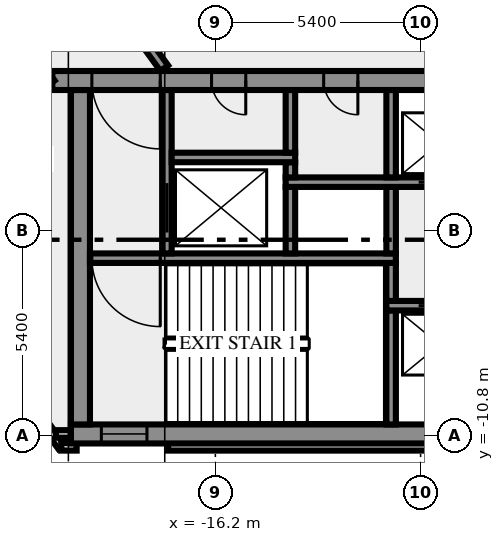
"""IFC4 building model, lengths in metres.
Left out: names, types, materials, properties, quantities, classifications, styles, units other than length and angle.
Written with IfcOpenShell. Run it as: python <this file> out.ifc"""

import sys

from ifc_helpers import new_model, si_unit, direction, frame, frame_2d, origin, place, context, subcontext, project, spatial, rectangle, extrude, element, fill, save


model = new_model("IFC4")
c1 = context("Model", 3, precision=1e-05, world=origin(), true_north=direction((0.0, 1.0)))
c2 = subcontext(c1, "Body", "Model", "MODEL_VIEW")
j1 = project(units=[si_unit("LENGTHUNIT", "METRE"), si_unit("PLANEANGLEUNIT", "RADIAN")], contexts=[c1])
p1 = place(None, origin())
s1 = spatial("IfcSite", under=j1, at=p1, CompositionType="ELEMENT")
p2 = place(p1, origin())
s2 = spatial("IfcBuilding", under=s1, at=p2, CompositionType="ELEMENT")
p3 = place(p2, frame((0.0, 0.0, 63.0)))
s3 = spatial("IfcBuildingStorey", under=s2, at=p3, CompositionType="ELEMENT", Elevation=63.0)
p4 = place(p3, frame((-21.833, -8.909, 0.0), z_axis=(0.0, 0.0, 1.0), x_axis=(0.587766567315, -0.809030569476, 0.0)))
e1 = element("IfcWall", 1, at=p4, inside=s3, PredefinedType="SOLIDWALL", context=c2, shape_type="SweptSolid", body=[
    extrude(rectangle(XDim=2.688, YDim=0.2, at=frame_2d((1.344, 0.0))), origin(), (0.0, 0.0, 1.0), 3.65),
])
p5 = place(p3, frame((-20.256, -11.088, 0.0), z_axis=(0.0, 0.0, 1.0), x_axis=(1.0, 0.0, 0.0)))
e2 = element("IfcWall", 2, at=p5, inside=s3, PredefinedType="SOLIDWALL", context=c2, shape_type="SweptSolid", body=[
    extrude(rectangle(XDim=0.406, YDim=0.2, at=frame_2d((0.203, 0.0))), origin(), (0.0, 0.0, 1.0), 3.65),
])
p6 = place(p3, frame((-17.444, -11.088, 0.0), z_axis=(0.0, 0.0, 1.0), x_axis=(1.0, 0.0, 0.0)))
e3 = element("IfcWall", 3, at=p6, inside=s3, PredefinedType="SOLIDWALL", context=c2, shape_type="SweptSolid", body=[
    extrude(rectangle(XDim=34.888, YDim=0.2, at=frame_2d((17.444, 0.0))), origin(), (0.0, 0.0, 1.0), 3.65),
])
p7 = place(p3, frame((-19.98, -10.75, 0.0), z_axis=(0.0, 0.0, 1.0), x_axis=(-1.0, 0.0, 0.0)))
e4 = element("IfcWall", 4, at=p7, inside=s3, PredefinedType="SOLIDWALL", context=c2, shape_type="SweptSolid", body=[
    extrude(rectangle(XDim=0.417, YDim=0.2, at=frame_2d((0.208, 0.0))), origin(), (0.0, 0.0, 1.0), 3.65),
])
p8 = place(p3, frame((-20.0, -10.75, 0.0), z_axis=(0.0, 0.0, 1.0), x_axis=(1.0, 0.0, 0.0)))
e5 = element("IfcWall", 5, at=p8, inside=s3, PredefinedType="SHEAR", context=c2, shape_type="SweptSolid", body=[
    extrude(rectangle(XDim=40.0, YDim=0.5, at=frame_2d((20.0, 0.0))), origin(), (0.0, 0.0, 1.0), 3.65),
])
p9 = place(p8, frame((0.8, 0.0, 1.0)))
e6 = element("IfcOpeningElement", 6, at=p9, cuts=e5, PredefinedType="OPENING", context=c2, shape_type="SweptSolid", body=[
    extrude(rectangle(XDim=1.2, YDim=1.2, at=frame_2d((0.6, 0.6))), frame((0.0, 0.26, 0.0), z_axis=(0.0, -1.0, 0.0), x_axis=(1.0, 0.0, 0.0)), (0.0, 0.0, 1.0), 0.52),
])
p10 = place(p8, frame((38.0, 0.0, 1.0)))
e7 = element("IfcOpeningElement", 7, at=p10, cuts=e5, PredefinedType="OPENING", context=c2, shape_type="SweptSolid", body=[
    extrude(rectangle(XDim=1.2, YDim=1.2, at=frame_2d((0.6, 0.6))), frame((0.0, 0.26, 0.0), z_axis=(0.0, -1.0, 0.0), x_axis=(1.0, 0.0, 0.0)), (0.0, 0.0, 1.0), 0.52),
])
p11 = place(p3, frame((-19.75, -10.5, 0.0), z_axis=(0.0, 0.0, 1.0), x_axis=(0.0, 1.0, 0.0)))
e8 = element("IfcWall", 8, at=p11, inside=s3, PredefinedType="SHEAR", context=c2, shape_type="SweptSolid", body=[
    extrude(rectangle(XDim=8.8, YDim=0.5, at=frame_2d((4.4, 0.0))), origin(), (0.0, 0.0, 1.0), 3.65),
])
p12 = place(p3, frame((-11.575, -10.5, 0.0), z_axis=(0.0, 0.0, 1.0), x_axis=(0.0, 1.0, 0.0)))
e9 = element("IfcWall", 9, at=p12, inside=s3, PredefinedType="SHEAR", context=c2, shape_type="SweptSolid", body=[
    extrude(rectangle(XDim=3.0, YDim=0.25, at=frame_2d((1.5, 0.0))), origin(), (0.0, 0.0, 1.0), 3.65),
])
p13 = place(p3, frame((11.7, -7.375, 0.0), z_axis=(0.0, 0.0, 1.0), x_axis=(-1.0, 0.0, 0.0)))
e10 = element("IfcWall", 10, at=p13, inside=s3, PredefinedType="SHEAR", context=c2, shape_type="SweptSolid", body=[
    extrude(rectangle(XDim=23.4, YDim=0.25, at=frame_2d((11.7, 0.0))), origin(), (0.0, 0.0, 1.0), 3.65),
])
p14 = place(p13, frame((21.45, 0.0, 0.0)))
e11 = element("IfcOpeningElement", 11, at=p14, cuts=e10, PredefinedType="OPENING", context=c2, shape_type="SweptSolid", body=[
    extrude(rectangle(XDim=1.1, YDim=2.1, at=frame_2d((0.55, 1.05))), frame((0.0, 0.135, 0.0), z_axis=(0.0, -1.0, 0.0), x_axis=(1.0, 0.0, 0.0)), (0.0, 0.0, 1.0), 0.27),
])
p15 = place(p13, frame((18.95, 0.0, 0.0)))
e12 = element("IfcOpeningElement", 12, at=p15, cuts=e10, PredefinedType="OPENING", context=c2, shape_type="SweptSolid", body=[
    extrude(rectangle(XDim=1.1, YDim=2.1, at=frame_2d((0.55, 1.05))), frame((0.0, 0.135, 0.0), z_axis=(0.0, -1.0, 0.0), x_axis=(1.0, 0.0, 0.0)), (0.0, 0.0, 1.0), 0.27),
])
p16 = place(p13, frame((16.45, 0.0, 0.0)))
e13 = element("IfcOpeningElement", 13, at=p16, cuts=e10, PredefinedType="OPENING", context=c2, shape_type="SweptSolid", body=[
    extrude(rectangle(XDim=1.1, YDim=2.1, at=frame_2d((0.55, 1.05))), frame((0.0, 0.135, 0.0), z_axis=(0.0, -1.0, 0.0), x_axis=(1.0, 0.0, 0.0)), (0.0, 0.0, 1.0), 0.27),
])
p17 = place(p13, frame((14.5, 0.0, 0.0)))
e14 = element("IfcOpeningElement", 14, at=p17, cuts=e10, PredefinedType="OPENING", context=c2, shape_type="SweptSolid", body=[
    extrude(rectangle(XDim=0.9, YDim=2.1, at=frame_2d((0.45, 1.05))), frame((0.0, 0.135, 0.0), z_axis=(0.0, -1.0, 0.0), x_axis=(1.0, 0.0, 0.0)), (0.0, 0.0, 1.0), 0.27),
])
p18 = place(p13, frame((12.95, 0.0, 0.0)))
e15 = element("IfcOpeningElement", 15, at=p18, cuts=e10, PredefinedType="OPENING", context=c2, shape_type="SweptSolid", body=[
    extrude(rectangle(XDim=0.9, YDim=2.1, at=frame_2d((0.45, 1.05))), frame((0.0, 0.135, 0.0), z_axis=(0.0, -1.0, 0.0), x_axis=(1.0, 0.0, 0.0)), (0.0, 0.0, 1.0), 0.27),
])
p19 = place(p13, frame((11.475, 0.0, 0.0)))
e16 = element("IfcOpeningElement", 16, at=p19, cuts=e10, PredefinedType="OPENING", context=c2, shape_type="SweptSolid", body=[
    extrude(rectangle(XDim=0.9, YDim=2.1, at=frame_2d((0.45, 1.05))), frame((0.0, 0.135, 0.0), z_axis=(0.0, -1.0, 0.0), x_axis=(1.0, 0.0, 0.0)), (0.0, 0.0, 1.0), 0.27),
])
p20 = place(p13, frame((10.45, 0.0, 0.0)))
e17 = element("IfcOpeningElement", 17, at=p20, cuts=e10, PredefinedType="OPENING", context=c2, shape_type="SweptSolid", body=[
    extrude(rectangle(XDim=0.5, YDim=2.1, at=frame_2d((0.25, 1.05))), frame((0.0, 0.135, 0.0), z_axis=(0.0, -1.0, 0.0), x_axis=(1.0, 0.0, 0.0)), (0.0, 0.0, 1.0), 0.27),
])
p21 = place(p3, frame((-11.575, -7.25, 0.0), z_axis=(0.0, 0.0, 1.0), x_axis=(0.0, 1.0, 0.0)))
e18 = element("IfcWall", 18, at=p21, inside=s3, PredefinedType="SHEAR", context=c2, shape_type="SweptSolid", body=[
    extrude(rectangle(XDim=1.0, YDim=0.25, at=frame_2d((0.5, 0.0))), origin(), (0.0, 0.0, 1.0), 3.65),
])
p22 = place(p3, frame((-11.45, -6.125, 0.0), z_axis=(0.0, 0.0, 1.0), x_axis=(-1.0, 0.0, 0.0)))
e19 = element("IfcWall", 19, at=p22, inside=s3, PredefinedType="SHEAR", context=c2, shape_type="SweptSolid", body=[
    extrude(rectangle(XDim=8.05, YDim=0.25, at=frame_2d((4.025, 0.0))), origin(), (0.0, 0.0, 1.0), 3.65),
])
p23 = place(p22, frame((6.2, 0.0, 0.0)))
e20 = element("IfcOpeningElement", 20, at=p23, cuts=e19, PredefinedType="OPENING", context=c2, shape_type="SweptSolid", body=[
    extrude(rectangle(XDim=1.8, YDim=2.1, at=frame_2d((0.9, 1.05))), frame((0.0, 0.135, 0.0), z_axis=(0.0, -1.0, 0.0), x_axis=(1.0, 0.0, 0.0)), (0.0, 0.0, 1.0), 0.27),
])
p24 = place(p3, frame((-17.475, -6.0, 0.0), z_axis=(0.0, 0.0, 1.0), x_axis=(0.0, 1.0, 0.0)))
e21 = element("IfcWall", 21, at=p24, inside=s3, PredefinedType="SHEAR", context=c2, shape_type="SweptSolid", body=[
    extrude(rectangle(XDim=4.3, YDim=0.25, at=frame_2d((2.15, 0.0))), origin(), (0.0, 0.0, 1.0), 3.65),
])
p25 = place(p24, frame((0.55, 0.0, 0.0)))
e22 = element("IfcOpeningElement", 22, at=p25, cuts=e21, PredefinedType="OPENING", context=c2, shape_type="SweptSolid", body=[
    extrude(rectangle(XDim=1.3, YDim=2.1, at=frame_2d((0.65, 1.05))), frame((0.0, 0.135, 0.0), z_axis=(0.0, -1.0, 0.0), x_axis=(1.0, 0.0, 0.0)), (0.0, 0.0, 1.0), 0.27),
])
for number, where, z_axis, x_axis in (
    (23, (-14.225, -6.0, 0.0), (0.0, 0.0, 1.0), (0.0, 1.0, 0.0)),
    (24, (-11.575, -6.0, 0.0), (0.0, 0.0, 1.0), (0.0, 1.0, 0.0)),
):
    element("IfcWall", number, at=place(p3, frame(where, z_axis=z_axis, x_axis=x_axis)), inside=s3, PredefinedType="SHEAR", context=c2, shape_type="SweptSolid", body=[
        extrude(rectangle(XDim=1.75, YDim=0.25, at=frame_2d((0.875, 0.0))), origin(), (0.0, 0.0, 1.0), 3.65),
    ])
p26 = place(p3, frame((-14.35, -4.125, 0.0), z_axis=(0.0, 0.0, 1.0), x_axis=(1.0, 0.0, 0.0)))
e25 = element("IfcWall", 25, at=p26, inside=s3, PredefinedType="SHEAR", context=c2, shape_type="SweptSolid", body=[
    extrude(rectangle(XDim=12.7, YDim=0.25, at=frame_2d((6.35, 0.0))), origin(), (0.0, 0.0, 1.0), 3.65),
])
p27 = place(p26, frame((3.5, 0.0, 0.0)))
e26 = element("IfcOpeningElement", 26, at=p27, cuts=e25, PredefinedType="OPENING", context=c2, shape_type="SweptSolid", body=[
    extrude(rectangle(XDim=1.1, YDim=2.1, at=frame_2d((0.55, 1.05))), frame((0.0, 0.135, 0.0), z_axis=(0.0, -1.0, 0.0), x_axis=(1.0, 0.0, 0.0)), (0.0, 0.0, 1.0), 0.27),
])
p28 = place(p26, frame((6.0, 0.0, 0.0)))
e27 = element("IfcOpeningElement", 27, at=p28, cuts=e25, PredefinedType="OPENING", context=c2, shape_type="SweptSolid", body=[
    extrude(rectangle(XDim=1.1, YDim=2.1, at=frame_2d((0.55, 1.05))), frame((0.0, 0.135, 0.0), z_axis=(0.0, -1.0, 0.0), x_axis=(1.0, 0.0, 0.0)), (0.0, 0.0, 1.0), 0.27),
])
p29 = place(p26, frame((8.5, 0.0, 0.0)))
e28 = element("IfcOpeningElement", 28, at=p29, cuts=e25, PredefinedType="OPENING", context=c2, shape_type="SweptSolid", body=[
    extrude(rectangle(XDim=1.1, YDim=2.1, at=frame_2d((0.55, 1.05))), frame((0.0, 0.135, 0.0), z_axis=(0.0, -1.0, 0.0), x_axis=(1.0, 0.0, 0.0)), (0.0, 0.0, 1.0), 0.27),
])
p30 = place(p3, frame((-14.225, -4.0, 0.0), z_axis=(0.0, 0.0, 1.0), x_axis=(0.0, 1.0, 0.0)))
e29 = element("IfcWall", 29, at=p30, inside=s3, PredefinedType="SHEAR", context=c2, shape_type="SweptSolid", body=[
    extrude(rectangle(XDim=0.4, YDim=0.25, at=frame_2d((0.2, 0.0))), origin(), (0.0, 0.0, 1.0), 3.65),
])
p31 = place(p3, frame((-11.575, -4.0, 0.0), z_axis=(0.0, 0.0, 1.0), x_axis=(0.0, 1.0, 0.0)))
e30 = element("IfcWall", 30, at=p31, inside=s3, PredefinedType="SHEAR", context=c2, shape_type="SweptSolid", body=[
    extrude(rectangle(XDim=2.3, YDim=0.25, at=frame_2d((1.15, 0.0))), origin(), (0.0, 0.0, 1.0), 3.65),
])
p32 = place(p3, frame((-17.35, -3.475, 0.0), z_axis=(0.0, 0.0, 1.0), x_axis=(1.0, 0.0, 0.0)))
e31 = element("IfcWall", 31, at=p32, inside=s3, PredefinedType="SHEAR", context=c2, shape_type="SweptSolid", body=[
    extrude(rectangle(XDim=3.25, YDim=0.25, at=frame_2d((1.625, 0.0))), origin(), (0.0, 0.0, 1.0), 3.65),
])
p33 = place(p3, frame((-14.225, -3.35, 0.0), z_axis=(0.0, 0.0, 1.0), x_axis=(0.0, 1.0, 0.0)))
e32 = element("IfcWall", 32, at=p33, inside=s3, PredefinedType="SHEAR", context=c2, shape_type="SweptSolid", body=[
    extrude(rectangle(XDim=1.65, YDim=0.25, at=frame_2d((0.825, 0.0))), origin(), (0.0, 0.0, 1.0), 3.65),
])
p34 = place(p3, frame((20.49, -1.45, 0.0), z_axis=(0.0, 0.0, 1.0), x_axis=(-1.0, 0.0, 0.0)))
e33 = element("IfcWall", 33, at=p34, inside=s3, PredefinedType="SHEAR", context=c2, shape_type="SweptSolid", body=[
    extrude(rectangle(XDim=40.98, YDim=0.5, at=frame_2d((20.49, 0.0))), origin(), (0.0, 0.0, 1.0), 3.65),
])
p35 = place(p34, frame((38.14, 0.0, 0.0)))
e34 = element("IfcOpeningElement", 34, at=p35, cuts=e33, PredefinedType="OPENING", context=c2, shape_type="SweptSolid", body=[
    extrude(rectangle(XDim=1.8, YDim=2.1, at=frame_2d((0.9, 1.05))), frame((0.0, 0.26, 0.0), z_axis=(0.0, -1.0, 0.0), x_axis=(1.0, 0.0, 0.0)), (0.0, 0.0, 1.0), 0.52),
])
p36 = place(p34, frame((35.89, 0.0, 0.0)))
e35 = element("IfcOpeningElement", 35, at=p36, cuts=e33, PredefinedType="OPENING", context=c2, shape_type="SweptSolid", body=[
    extrude(rectangle(XDim=0.9, YDim=2.1, at=frame_2d((0.45, 1.05))), frame((0.0, 0.26, 0.0), z_axis=(0.0, -1.0, 0.0), x_axis=(1.0, 0.0, 0.0)), (0.0, 0.0, 1.0), 0.52),
])
p37 = place(p34, frame((32.94, 0.0, 0.0)))
e36 = element("IfcOpeningElement", 36, at=p37, cuts=e33, PredefinedType="OPENING", context=c2, shape_type="SweptSolid", body=[
    extrude(rectangle(XDim=0.9, YDim=2.1, at=frame_2d((0.45, 1.05))), frame((0.0, 0.26, 0.0), z_axis=(0.0, -1.0, 0.0), x_axis=(1.0, 0.0, 0.0)), (0.0, 0.0, 1.0), 0.52),
])
p38 = place(p34, frame((19.59, 0.0, 0.0)))
e37 = element("IfcOpeningElement", 37, at=p38, cuts=e33, PredefinedType="OPENING", context=c2, shape_type="SweptSolid", body=[
    extrude(rectangle(XDim=2.0, YDim=2.1, at=frame_2d((1.0, 1.05))), frame((0.0, 0.26, 0.0), z_axis=(0.0, -1.0, 0.0), x_axis=(1.0, 0.0, 0.0)), (0.0, 0.0, 1.0), 0.52),
])
p39 = place(p34, frame((7.14, 0.0, 0.0)))
e38 = element("IfcOpeningElement", 38, at=p39, cuts=e33, PredefinedType="OPENING", context=c2, shape_type="SweptSolid", body=[
    extrude(rectangle(XDim=0.9, YDim=2.1, at=frame_2d((0.45, 1.05))), frame((0.0, 0.26, 0.0), z_axis=(0.0, -1.0, 0.0), x_axis=(1.0, 0.0, 0.0)), (0.0, 0.0, 1.0), 0.52),
])
p40 = place(p34, frame((5.028, 0.0, 0.0)))
e39 = element("IfcOpeningElement", 39, at=p40, cuts=e33, PredefinedType="OPENING", context=c2, shape_type="SweptSolid", body=[
    extrude(rectangle(XDim=0.8, YDim=2.1, at=frame_2d((0.4, 1.05))), frame((0.0, 0.26, 0.0), z_axis=(0.0, -1.0, 0.0), x_axis=(1.0, 0.0, 0.0)), (0.0, 0.0, 1.0), 0.52),
])
p41 = place(p34, frame((3.452, 0.0, 0.0)))
e40 = element("IfcOpeningElement", 40, at=p41, cuts=e33, PredefinedType="OPENING", context=c2, shape_type="SweptSolid", body=[
    extrude(rectangle(XDim=0.8, YDim=2.1, at=frame_2d((0.4, 1.05))), frame((0.0, 0.26, 0.0), z_axis=(0.0, -1.0, 0.0), x_axis=(1.0, 0.0, 0.0)), (0.0, 0.0, 1.0), 0.52),
])
p42 = place(p34, frame((1.04, 0.0, 0.0)))
e41 = element("IfcOpeningElement", 41, at=p42, cuts=e33, PredefinedType="OPENING", context=c2, shape_type="SweptSolid", body=[
    extrude(rectangle(XDim=1.8, YDim=2.1, at=frame_2d((0.9, 1.05))), frame((0.0, 0.26, 0.0), z_axis=(0.0, -1.0, 0.0), x_axis=(1.0, 0.0, 0.0)), (0.0, 0.0, 1.0), 0.52),
])
p43 = place(p3, frame((-20.531, -1.523, 0.0), z_axis=(0.0, 0.0, 1.0), x_axis=(-0.587784593204, 0.809017473231, 0.0)))
e42 = element("IfcWall", 42, at=p43, inside=s3, PredefinedType="SOLIDWALL", context=c2, shape_type="SweptSolid", body=[
    extrude(rectangle(XDim=44.67, YDim=0.25, at=frame_2d((22.335, 0.0))), origin(), (0.0, 0.0, 1.0), 3.65),
])
p44 = place(p43, frame((43.046, 0.0, 0.0)))
e43 = element("IfcOpeningElement", 43, at=p44, cuts=e42, PredefinedType="OPENING", context=c2, shape_type="SweptSolid", body=[
    extrude(rectangle(XDim=1.2, YDim=2.1, at=frame_2d((0.6, 1.05))), frame((0.0, 0.135, 0.0), z_axis=(0.0, -1.0, 0.0), x_axis=(1.0, 0.0, 0.0)), (0.0, 0.0, 1.0), 0.27),
])
p45 = place(p43, frame((21.266, 0.0, 0.0)))
e44 = element("IfcOpeningElement", 44, at=p45, cuts=e42, PredefinedType="OPENING", context=c2, shape_type="SweptSolid", body=[
    extrude(rectangle(XDim=1.2, YDim=2.1, at=frame_2d((0.6, 1.05))), frame((0.0, 0.135, 0.0), z_axis=(0.0, -1.0, 0.0), x_axis=(1.0, 0.0, 0.0)), (0.0, 0.0, 1.0), 0.27),
])
p46 = place(p43, frame((17.015, 0.0, 0.0)))
e45 = element("IfcOpeningElement", 45, at=p46, cuts=e42, PredefinedType="OPENING", context=c2, shape_type="SweptSolid", body=[
    extrude(rectangle(XDim=0.9, YDim=2.1, at=frame_2d((0.45, 1.05))), frame((0.0, 0.135, 0.0), z_axis=(0.0, -1.0, 0.0), x_axis=(1.0, 0.0, 0.0)), (0.0, 0.0, 1.0), 0.27),
])
p47 = place(p43, frame((2.924, 0.0, 0.0)))
e46 = element("IfcOpeningElement", 46, at=p47, cuts=e42, PredefinedType="OPENING", context=c2, shape_type="SweptSolid", body=[
    extrude(rectangle(XDim=1.8, YDim=2.1, at=frame_2d((0.9, 1.05))), frame((0.0, 0.135, 0.0), z_axis=(0.0, -1.0, 0.0), x_axis=(1.0, 0.0, 0.0)), (0.0, 0.0, 1.0), 0.27),
])
p48 = place(p43, frame((18.616, 0.0, 0.0)))
e47 = element("IfcOpeningElement", 47, at=p48, cuts=e42, PredefinedType="OPENING", context=c2, shape_type="SweptSolid", body=[
    extrude(rectangle(XDim=0.9, YDim=2.1, at=frame_2d((0.45, 1.05))), frame((0.0, 0.135, 0.0), z_axis=(0.0, -1.0, 0.0), x_axis=(1.0, 0.0, 0.0)), (0.0, 0.0, 1.0), 0.27),
])
p49 = place(p43, frame((7.816, 0.0, 0.0)))
e48 = element("IfcOpeningElement", 48, at=p49, cuts=e42, PredefinedType="OPENING", context=c2, shape_type="SweptSolid", body=[
    extrude(rectangle(XDim=0.9, YDim=2.1, at=frame_2d((0.45, 1.05))), frame((0.0, 0.135, 0.0), z_axis=(0.0, -1.0, 0.0), x_axis=(1.0, 0.0, 0.0)), (0.0, 0.0, 1.0), 0.27),
])
p50 = place(p3, frame((-37.232, 25.972, 0.0), z_axis=(0.0, 0.0, 1.0), x_axis=(0.587786323093, -0.809016216391, 0.0)))
e49 = element("IfcWall", 49, at=p50, inside=s3, PredefinedType="SOLIDWALL", context=c2, shape_type="SweptSolid", body=[
    extrude(rectangle(XDim=33.493, YDim=0.25, at=frame_2d((16.747, 0.0))), origin(), (0.0, 0.0, 1.0), 3.65),
])
p51 = place(p50, frame((28.301, 0.0, 0.0)))
e50 = element("IfcOpeningElement", 50, at=p51, cuts=e49, PredefinedType="OPENING", context=c2, shape_type="SweptSolid", body=[
    extrude(rectangle(XDim=1.8, YDim=2.1, at=frame_2d((0.9, 1.05))), frame((0.0, 0.135, 0.0), z_axis=(0.0, -1.0, 0.0), x_axis=(1.0, 0.0, 0.0)), (0.0, 0.0, 1.0), 0.27),
])
p52 = place(p50, frame((4.235, 0.0, 0.0)))
e51 = element("IfcOpeningElement", 51, at=p52, cuts=e49, PredefinedType="OPENING", context=c2, shape_type="SweptSolid", body=[
    extrude(rectangle(XDim=1.8, YDim=2.1, at=frame_2d((0.9, 1.05))), frame((0.0, 0.135, 0.0), z_axis=(0.0, -1.0, 0.0), x_axis=(1.0, 0.0, 0.0)), (0.0, 0.0, 1.0), 0.27),
])
p53 = place(p50, frame((2.685, 0.0, 0.0)))
e52 = element("IfcOpeningElement", 52, at=p53, cuts=e49, PredefinedType="OPENING", context=c2, shape_type="SweptSolid", body=[
    extrude(rectangle(XDim=0.9, YDim=2.1, at=frame_2d((0.45, 1.05))), frame((0.0, 0.135, 0.0), z_axis=(0.0, -1.0, 0.0), x_axis=(1.0, 0.0, 0.0)), (0.0, 0.0, 1.0), 0.27),
])
p54 = place(p9, origin())
e53 = element("IfcWindow", 53, at=p54, inside=s3, PartitioningType="SINGLE_PANEL", PredefinedType="WINDOW", context=c2, shape_type="SweptSolid", body=[
    extrude(rectangle(XDim=1.2, YDim=1.2, at=frame_2d((0.6, 0.6))), frame((0.0, 0.03, 0.0), z_axis=(0.0, -1.0, 0.0), x_axis=(1.0, 0.0, 0.0)), (0.0, 0.0, 1.0), 0.06),
])
fill(e6, e53)
p55 = place(p14, origin())
e54 = element("IfcDoor", 54, at=p55, inside=s3, OperationType="DOUBLE_DOOR_SLIDING", PredefinedType="DOOR", context=c2, shape_type="SweptSolid", body=[
    extrude(rectangle(XDim=1.1, YDim=2.1, at=frame_2d((0.55, 1.05))), frame((0.0, 0.025, 0.0), z_axis=(0.0, -1.0, 0.0), x_axis=(1.0, 0.0, 0.0)), (0.0, 0.0, 1.0), 0.05),
])
fill(e11, e54)
p56 = place(p23, origin())
e55 = element("IfcDoor", 55, at=p56, inside=s3, OperationType="DOUBLE_DOOR_SINGLE_SWING", PredefinedType="DOOR", context=c2, shape_type="SweptSolid", body=[
    extrude(rectangle(XDim=1.8, YDim=2.1, at=frame_2d((0.9, 1.05))), frame((0.0, 0.025, 0.0), z_axis=(0.0, -1.0, 0.0), x_axis=(1.0, 0.0, 0.0)), (0.0, 0.0, 1.0), 0.05),
])
fill(e20, e55)
p57 = place(p25, origin())
e56 = element("IfcDoor", 56, at=p57, inside=s3, OperationType="DOUBLE_DOOR_SLIDING", PredefinedType="DOOR", context=c2, shape_type="SweptSolid", body=[
    extrude(rectangle(XDim=1.3, YDim=2.1, at=frame_2d((0.65, 1.05))), frame((0.0, 0.025, 0.0), z_axis=(0.0, -1.0, 0.0), x_axis=(1.0, 0.0, 0.0)), (0.0, 0.0, 1.0), 0.05),
])
fill(e22, e56)
p58 = place(p27, origin())
e57 = element("IfcDoor", 57, at=p58, inside=s3, OperationType="DOUBLE_DOOR_SLIDING", PredefinedType="DOOR", context=c2, shape_type="SweptSolid", body=[
    extrude(rectangle(XDim=1.1, YDim=2.1, at=frame_2d((0.55, 1.05))), frame((0.0, 0.025, 0.0), z_axis=(0.0, -1.0, 0.0), x_axis=(1.0, 0.0, 0.0)), (0.0, 0.0, 1.0), 0.05),
])
fill(e26, e57)
p59 = place(p35, origin())
e58 = element("IfcDoor", 58, at=p59, inside=s3, OperationType="DOUBLE_DOOR_SINGLE_SWING", PredefinedType="DOOR", context=c2, shape_type="SweptSolid", body=[
    extrude(rectangle(XDim=1.8, YDim=2.1, at=frame_2d((0.9, 1.05))), frame((0.0, 0.025, 0.0), z_axis=(0.0, -1.0, 0.0), x_axis=(1.0, 0.0, 0.0)), (0.0, 0.0, 1.0), 0.05),
])
fill(e34, e58)
p60 = place(p36, origin())
e59 = element("IfcDoor", 59, at=p60, inside=s3, OperationType="SINGLE_SWING_RIGHT", PredefinedType="DOOR", context=c2, shape_type="SweptSolid", body=[
    extrude(rectangle(XDim=0.9, YDim=2.1, at=frame_2d((0.45, 1.05))), frame((0.0, 0.025, 0.0), z_axis=(0.0, -1.0, 0.0), x_axis=(1.0, 0.0, 0.0)), (0.0, 0.0, 1.0), 0.05),
])
fill(e35, e59)
p61 = place(p37, origin())
e60 = element("IfcDoor", 60, at=p61, inside=s3, OperationType="SINGLE_SWING_RIGHT", PredefinedType="DOOR", context=c2, shape_type="SweptSolid", body=[
    extrude(rectangle(XDim=0.9, YDim=2.1, at=frame_2d((0.45, 1.05))), frame((0.0, 0.025, 0.0), z_axis=(0.0, -1.0, 0.0), x_axis=(1.0, 0.0, 0.0)), (0.0, 0.0, 1.0), 0.05),
])
fill(e36, e60)
save(model, sys.argv[1])
